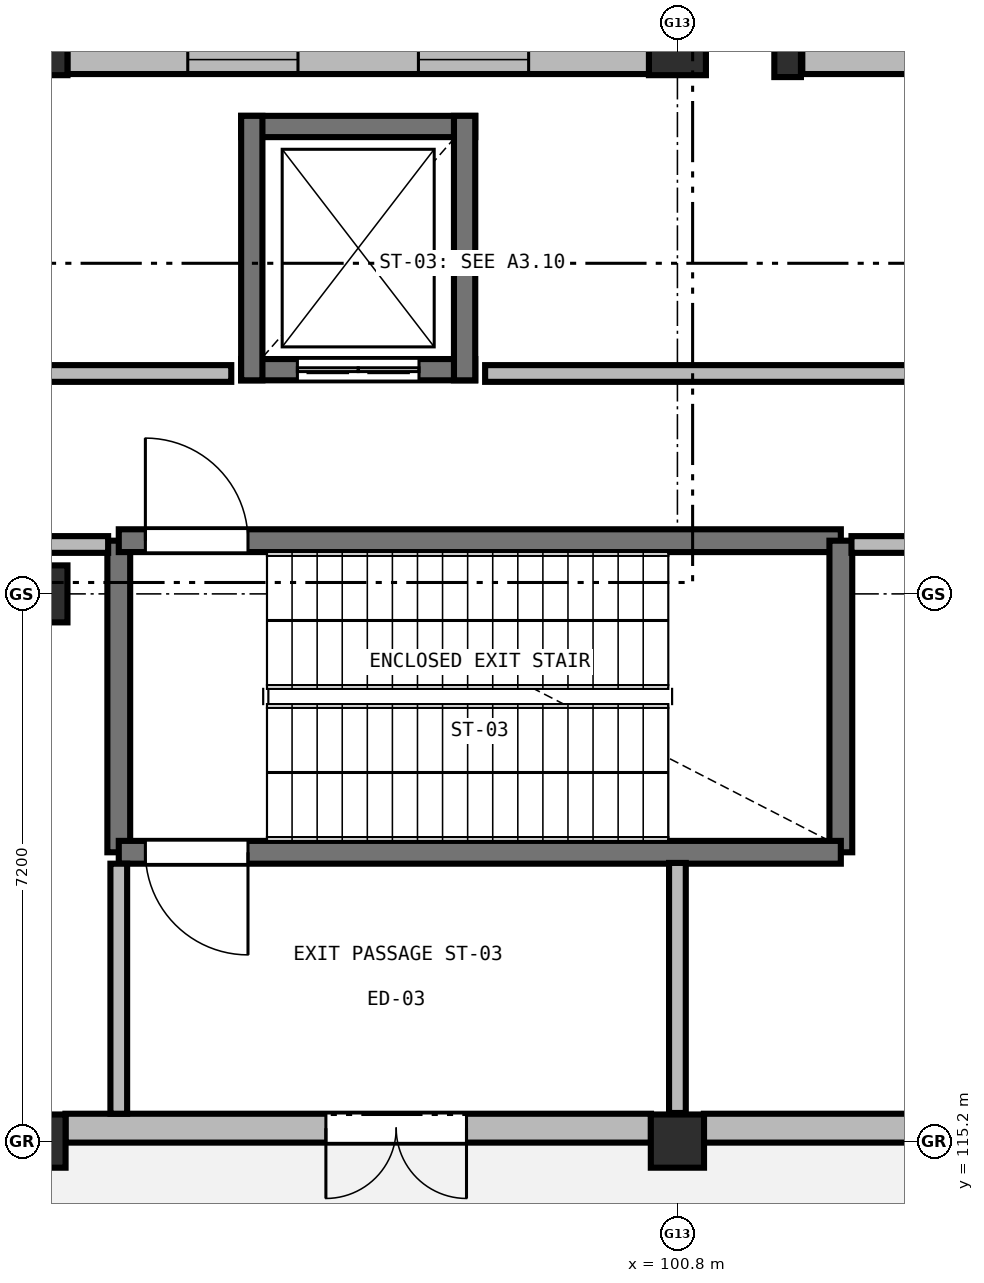
"""IFC4 building model, lengths in metres.
Left out: names, types, materials, properties, quantities, classifications, styles, units other than length and angle.
Written with IfcOpenShell. Run it as: python <this file> out.ifc"""

import sys

from ifc_helpers import new_model, si_unit, direction, frame, frame_2d, origin, origin_2d, place, context, subcontext, project, spatial, rectangle, extrude, element, fill, save


model = new_model("IFC4")
c1 = context("Model", 3, precision=1e-05, world=origin(), true_north=direction((0.0, 1.0)))
c2 = subcontext(c1, "Body", "Model", "MODEL_VIEW")
j1 = project(units=[si_unit("LENGTHUNIT", "METRE"), si_unit("PLANEANGLEUNIT", "RADIAN")], contexts=[c1])
p1 = place(None, origin())
s1 = spatial("IfcSite", under=j1, at=p1, CompositionType="ELEMENT")
p2 = place(p1, origin())
s2 = spatial("IfcBuilding", under=s1, at=p2, CompositionType="ELEMENT")
p3 = place(p2, origin())
s3 = spatial("IfcBuildingStorey", under=s2, at=p3, CompositionType="ELEMENT", Elevation=0.0)
p4 = place(p3, frame((92.4, 115.2, 0.0), z_axis=(0.0, 0.0, 1.0), x_axis=(1.0, 0.0, 0.0)))
e1 = element("IfcColumn", 1, at=p4, inside=s3, PredefinedType="COLUMN", context=c2, shape_type="SweptSolid", body=[
    extrude(rectangle(XDim=0.7, YDim=0.7, at=origin_2d()), origin(), (0.0, 0.0, 1.0), 5.1),
])
for number, where, z_axis, x_axis in (
    (2, (92.4, 122.4, 0.0), (0.0, 0.0, 1.0), (1.0, 0.0, 0.0)),
    (3, (92.4, 129.6, 0.0), (0.0, 0.0, 1.0), (1.0, 0.0, 0.0)),
):
    element("IfcColumn", number, at=place(p3, frame(where, z_axis=z_axis, x_axis=x_axis)), inside=s3, PredefinedType="COLUMN", context=c2, shape_type="SweptSolid", body=[
        extrude(rectangle(XDim=0.75, YDim=0.75, at=origin_2d()), origin(), (0.0, 0.0, 1.0), 5.1),
    ])
p5 = place(p3, frame((100.8, 115.2, 0.0), z_axis=(0.0, 0.0, 1.0), x_axis=(1.0, 0.0, 0.0)))
e4 = element("IfcColumn", 4, at=p5, inside=s3, PredefinedType="COLUMN", context=c2, shape_type="SweptSolid", body=[
    extrude(rectangle(XDim=0.7, YDim=0.7, at=origin_2d()), origin(), (0.0, 0.0, 1.0), 5.1),
])
p6 = place(p3, frame((100.8, 129.6, 0.0), z_axis=(0.0, 0.0, 1.0), x_axis=(1.0, 0.0, 0.0)))
e5 = element("IfcColumn", 5, at=p6, inside=s3, PredefinedType="COLUMN", context=c2, shape_type="SweptSolid", body=[
    extrude(rectangle(XDim=0.75, YDim=0.75, at=origin_2d()), origin(), (0.0, 0.0, 1.0), 5.1),
])
p7 = place(p3, frame((102.25, 129.45, 0.0), z_axis=(0.0, 0.0, 1.0), x_axis=(1.0, 0.0, 0.0)))
e6 = element("IfcColumn", 6, at=p7, inside=s3, PredefinedType="PILASTER", context=c2, shape_type="SweptSolid", body=[
    extrude(rectangle(XDim=0.35, YDim=0.5, at=origin_2d()), origin(), (0.0, 0.0, 1.0), 4.15),
])
p8 = place(p3, frame((92.773, 129.43, 0.0), z_axis=(0.0, 0.0, 1.0), x_axis=(1.0, 0.0, 0.0)))
e7 = element("IfcWall", 7, at=p8, inside=s3, PredefinedType="SOLIDWALL", context=c2, shape_type="SweptSolid", body=[
    extrude(rectangle(XDim=7.654, YDim=0.38, at=frame_2d((3.827, 0.0))), origin(), (0.0, 0.0, 1.0), 4.01),
])
p9 = place(p8, frame((1.585, 0.0, 0.95)))
e8 = element("IfcOpeningElement", 8, at=p9, cuts=e7, PredefinedType="OPENING", context=c2, shape_type="SweptSolid", body=[
    extrude(rectangle(XDim=1.45, YDim=1.85, at=frame_2d((0.725, 0.925))), frame((0.0, 0.2, 0.0), z_axis=(0.0, -1.0, 0.0), x_axis=(1.0, 0.0, 0.0)), (0.0, 0.0, 1.0), 0.4),
])
p10 = place(p8, frame((4.619, 0.0, 0.95)))
e9 = element("IfcOpeningElement", 9, at=p10, cuts=e7, PredefinedType="OPENING", context=c2, shape_type="SweptSolid", body=[
    extrude(rectangle(XDim=1.45, YDim=1.85, at=frame_2d((0.725, 0.925))), frame((0.0, 0.2, 0.0), z_axis=(0.0, -1.0, 0.0), x_axis=(1.0, 0.0, 0.0)), (0.0, 0.0, 1.0), 0.4),
])
p11 = place(p3, frame((102.443, 129.43, 0.0), z_axis=(0.0, 0.0, 1.0), x_axis=(1.0, 0.0, 0.0)))
e10 = element("IfcWall", 10, at=p11, inside=s3, PredefinedType="SOLIDWALL", context=c2, shape_type="SweptSolid", body=[
    extrude(rectangle(XDim=6.409, YDim=0.38, at=frame_2d((3.205, 0.0))), origin(), (0.0, 0.0, 1.0), 4.01),
])
p12 = place(p11, frame((2.004, 0.0, 0.95)))
e11 = element("IfcOpeningElement", 11, at=p12, cuts=e10, PredefinedType="OPENING", context=c2, shape_type="SweptSolid", body=[
    extrude(rectangle(XDim=2.4, YDim=2.1, at=frame_2d((1.2, 1.05))), frame((0.0, 0.2, 0.0), z_axis=(0.0, -1.0, 0.0), x_axis=(1.0, 0.0, 0.0)), (0.0, 0.0, 1.0), 0.4),
])
p13 = place(p3, frame((108.852, 115.37, 0.0), z_axis=(0.0, 0.0, 1.0), x_axis=(-1.0, 0.0, 0.0)))
e12 = element("IfcWall", 12, at=p13, inside=s3, PredefinedType="SOLIDWALL", context=c2, shape_type="SweptSolid", body=[
    extrude(rectangle(XDim=7.704, YDim=0.38, at=frame_2d((3.852, 0.0))), origin(), (0.0, 0.0, 1.0), 4.01),
])
p14 = place(p13, frame((2.852, 0.0, 0.0)))
e13 = element("IfcOpeningElement", 13, at=p14, cuts=e12, PredefinedType="OPENING", context=c2, shape_type="SweptSolid", body=[
    extrude(rectangle(XDim=2.0, YDim=2.4, at=frame_2d((1.0, 1.2))), frame((0.0, 0.2, 0.0), z_axis=(0.0, -1.0, 0.0), x_axis=(1.0, 0.0, 0.0)), (0.0, 0.0, 1.0), 0.4),
])
p15 = place(p3, frame((100.452, 115.37, 0.0), z_axis=(0.0, 0.0, 1.0), x_axis=(-1.0, 0.0, 0.0)))
e14 = element("IfcWall", 14, at=p15, inside=s3, PredefinedType="SOLIDWALL", context=c2, shape_type="SweptSolid", body=[
    extrude(rectangle(XDim=7.704, YDim=0.38, at=frame_2d((3.852, 0.0))), origin(), (0.0, 0.0, 1.0), 4.01),
])
p16 = place(p15, frame((2.427, 0.0, 0.0)))
e15 = element("IfcOpeningElement", 15, at=p16, cuts=e14, PredefinedType="OPENING", context=c2, shape_type="SweptSolid", body=[
    extrude(rectangle(XDim=1.85, YDim=2.3, at=frame_2d((0.925, 1.15))), frame((0.0, 0.2, 0.0), z_axis=(0.0, -1.0, 0.0), x_axis=(1.0, 0.0, 0.0)), (0.0, 0.0, 1.0), 0.4),
])
p17 = place(p3, frame((93.45, 119.0, 0.0), z_axis=(0.0, 0.0, 1.0), x_axis=(0.0, 1.0, 0.0)))
e16 = element("IfcWall", 16, at=p17, inside=s3, PredefinedType="SHEAR", context=c2, shape_type="SweptSolid", body=[
    extrude(rectangle(XDim=4.1, YDim=0.3, at=frame_2d((2.05, 0.0))), origin(), (0.0, 0.0, 1.0), 4.82),
])
p18 = place(p3, frame((93.45, 123.1, 0.0), z_axis=(0.0, 0.0, 1.0), x_axis=(1.0, 0.0, 0.0)))
e17 = element("IfcWall", 17, at=p18, inside=s3, PredefinedType="SHEAR", context=c2, shape_type="SweptSolid", body=[
    extrude(rectangle(XDim=9.5, YDim=0.3, at=frame_2d((4.75, 0.0))), origin(), (0.0, 0.0, 1.0), 4.82),
])
p19 = place(p18, frame((0.35, 0.0, 0.0)))
e18 = element("IfcOpeningElement", 18, at=p19, cuts=e17, PredefinedType="OPENING", context=c2, shape_type="SweptSolid", body=[
    extrude(rectangle(XDim=1.35, YDim=2.2, at=frame_2d((0.675, 1.1))), frame((0.0, 0.16, 0.0), z_axis=(0.0, -1.0, 0.0), x_axis=(1.0, 0.0, 0.0)), (0.0, 0.0, 1.0), 0.32),
])
p20 = place(p3, frame((102.95, 123.1, 0.0), z_axis=(0.0, 0.0, 1.0), x_axis=(0.0, -1.0, 0.0)))
e19 = element("IfcWall", 19, at=p20, inside=s3, PredefinedType="SHEAR", context=c2, shape_type="SweptSolid", body=[
    extrude(rectangle(XDim=4.1, YDim=0.3, at=frame_2d((2.05, 0.0))), origin(), (0.0, 0.0, 1.0), 4.82),
])
p21 = place(p3, frame((102.95, 119.0, 0.0), z_axis=(0.0, 0.0, 1.0), x_axis=(-1.0, 0.0, 0.0)))
e20 = element("IfcWall", 20, at=p21, inside=s3, PredefinedType="SHEAR", context=c2, shape_type="SweptSolid", body=[
    extrude(rectangle(XDim=9.5, YDim=0.3, at=frame_2d((4.75, 0.0))), origin(), (0.0, 0.0, 1.0), 4.82),
])
p22 = place(p21, frame((7.8, 0.0, 0.0)))
e21 = element("IfcOpeningElement", 21, at=p22, cuts=e20, PredefinedType="OPENING", context=c2, shape_type="SweptSolid", body=[
    extrude(rectangle(XDim=1.35, YDim=2.2, at=frame_2d((0.675, 1.1))), frame((0.0, 0.16, 0.0), z_axis=(0.0, -1.0, 0.0), x_axis=(1.0, 0.0, 0.0)), (0.0, 0.0, 1.0), 0.32),
])
p23 = place(p3, frame((98.14, 125.35, 0.0), z_axis=(0.0, 0.0, 1.0), x_axis=(-1.0, 0.0, 0.0)))
e22 = element("IfcWall", 22, at=p23, inside=s3, PredefinedType="SHEAR", context=c2, shape_type="SweptSolid", body=[
    extrude(rectangle(XDim=3.08, YDim=0.28, at=frame_2d((1.54, 0.0))), origin(), (0.0, 0.0, 1.0), 4.82),
])
p24 = place(p23, frame((0.74, 0.0, 0.0)))
e23 = element("IfcOpeningElement", 23, at=p24, cuts=e22, PredefinedType="OPENING", context=c2, shape_type="SweptSolid", body=[
    extrude(rectangle(XDim=1.6, YDim=2.2, at=frame_2d((0.8, 1.1))), frame((0.0, 0.15, 0.0), z_axis=(0.0, -1.0, 0.0), x_axis=(1.0, 0.0, 0.0)), (0.0, 0.0, 1.0), 0.3),
])
p25 = place(p3, frame((95.06, 128.55, 0.0), z_axis=(0.0, 0.0, 1.0), x_axis=(1.0, 0.0, 0.0)))
e24 = element("IfcWall", 24, at=p25, inside=s3, PredefinedType="SHEAR", context=c2, shape_type="SweptSolid", body=[
    extrude(rectangle(XDim=3.08, YDim=0.28, at=frame_2d((1.54, 0.0))), origin(), (0.0, 0.0, 1.0), 4.82),
])
for number, where, z_axis, x_axis in (
    (25, (95.2, 125.21, 0.0), (0.0, 0.0, 1.0), (0.0, 1.0, 0.0)),
    (26, (98.0, 128.69, 0.0), (0.0, 0.0, 1.0), (0.0, -1.0, 0.0)),
):
    element("IfcWall", number, at=place(p3, frame(where, z_axis=z_axis, x_axis=x_axis)), inside=s3, PredefinedType="SHEAR", context=c2, shape_type="SweptSolid", body=[
        extrude(rectangle(XDim=3.48, YDim=0.28, at=frame_2d((1.74, 0.0))), origin(), (0.0, 0.0, 1.0), 4.82),
    ])
p26 = place(p3, frame((75.6, 125.3, 0.0), z_axis=(0.0, 0.0, 1.0), x_axis=(1.0, 0.0, 0.0)))
e27 = element("IfcWall", 27, at=p26, inside=s3, PredefinedType="SOLIDWALL", context=c2, shape_type="SweptSolid", body=[
    extrude(rectangle(XDim=19.33, YDim=0.22, at=frame_2d((9.665, 0.0))), origin(), (0.0, 0.0, 1.0), 4.105),
])
p27 = place(p26, frame((3.375, 0.0, 0.0)))
e28 = element("IfcOpeningElement", 28, at=p27, cuts=e27, PredefinedType="OPENING", context=c2, shape_type="SweptSolid", body=[
    extrude(rectangle(XDim=1.65, YDim=2.2, at=frame_2d((0.825, 1.1))), frame((0.0, 0.12, 0.0), z_axis=(0.0, -1.0, 0.0), x_axis=(1.0, 0.0, 0.0)), (0.0, 0.0, 1.0), 0.24),
])
p28 = place(p3, frame((98.27, 125.3, 0.0), z_axis=(0.0, 0.0, 1.0), x_axis=(1.0, 0.0, 0.0)))
e29 = element("IfcWall", 29, at=p28, inside=s3, PredefinedType="SOLIDWALL", context=c2, shape_type="SweptSolid", body=[
    extrude(rectangle(XDim=10.93, YDim=0.22, at=frame_2d((5.465, 0.0))), origin(), (0.0, 0.0, 1.0), 4.105),
])
p29 = place(p3, frame((93.31, 123.05, 0.0), z_axis=(0.0, 0.0, 1.0), x_axis=(-1.0, 0.0, 0.0)))
e30 = element("IfcWall", 30, at=p29, inside=s3, PredefinedType="SOLIDWALL", context=c2, shape_type="SweptSolid", body=[
    extrude(rectangle(XDim=32.22, YDim=0.22, at=frame_2d((16.11, 0.0))), origin(), (0.0, 0.0, 1.0), 4.105),
])
p30 = place(p29, frame((27.61, 0.0, 0.0)))
e31 = element("IfcOpeningElement", 31, at=p30, cuts=e30, PredefinedType="OPENING", context=c2, shape_type="SweptSolid", body=[
    extrude(rectangle(XDim=1.2, YDim=2.15, at=frame_2d((0.6, 1.075))), frame((0.0, 0.12, 0.0), z_axis=(0.0, -1.0, 0.0), x_axis=(1.0, 0.0, 0.0)), (0.0, 0.0, 1.0), 0.24),
])
p31 = place(p3, frame((100.8, 115.57, 0.0), z_axis=(0.0, 0.0, 1.0), x_axis=(0.0, 1.0, 0.0)))
e32 = element("IfcWall", 32, at=p31, inside=s3, PredefinedType="SOLIDWALL", context=c2, shape_type="SweptSolid", body=[
    extrude(rectangle(XDim=3.29, YDim=0.22, at=frame_2d((1.645, 0.0))), origin(), (0.0, 0.0, 1.0), 4.005),
])
p32 = place(p3, frame((134.18, 123.05, 0.0), z_axis=(0.0, 0.0, 1.0), x_axis=(-1.0, 0.0, 0.0)))
e33 = element("IfcWall", 33, at=p32, inside=s3, PredefinedType="SOLIDWALL", context=c2, shape_type="SweptSolid", body=[
    extrude(rectangle(XDim=31.09, YDim=0.22, at=frame_2d((15.545, 0.0))), origin(), (0.0, 0.0, 1.0), 4.105),
])
p33 = place(p32, frame((28.605, 0.0, 0.0)))
e34 = element("IfcOpeningElement", 34, at=p33, cuts=e33, PredefinedType="OPENING", context=c2, shape_type="SweptSolid", body=[
    extrude(rectangle(XDim=1.15, YDim=2.15, at=frame_2d((0.575, 1.075))), frame((0.0, 0.12, 0.0), z_axis=(0.0, -1.0, 0.0), x_axis=(1.0, 0.0, 0.0)), (0.0, 0.0, 1.0), 0.24),
])
p34 = place(p3, frame((93.45, 115.56, 0.0), z_axis=(0.0, 0.0, 1.0), x_axis=(0.0, 1.0, 0.0)))
e35 = element("IfcWall", 35, at=p34, inside=s3, PredefinedType="SOLIDWALL", context=c2, shape_type="SweptSolid", body=[
    extrude(rectangle(XDim=3.29, YDim=0.22, at=frame_2d((1.645, 0.0))), origin(), (0.0, 0.0, 1.0), 4.005),
])
p35 = place(p9, origin())
e36 = element("IfcWindow", 36, at=p35, inside=s3, PartitioningType="SINGLE_PANEL", PredefinedType="WINDOW", context=c2, shape_type="SweptSolid", body=[
    extrude(rectangle(XDim=1.45, YDim=1.85, at=frame_2d((0.725, 0.925))), frame((0.0, 0.03, 0.0), z_axis=(0.0, -1.0, 0.0), x_axis=(1.0, 0.0, 0.0)), (0.0, 0.0, 1.0), 0.06),
])
fill(e8, e36)
p36 = place(p10, origin())
e37 = element("IfcWindow", 37, at=p36, inside=s3, PartitioningType="SINGLE_PANEL", PredefinedType="WINDOW", context=c2, shape_type="SweptSolid", body=[
    extrude(rectangle(XDim=1.45, YDim=1.85, at=frame_2d((0.725, 0.925))), frame((0.0, 0.03, 0.0), z_axis=(0.0, -1.0, 0.0), x_axis=(1.0, 0.0, 0.0)), (0.0, 0.0, 1.0), 0.06),
])
fill(e9, e37)
p37 = place(p16, origin())
e38 = element("IfcDoor", 38, at=p37, inside=s3, OperationType="DOUBLE_DOOR_SINGLE_SWING", PredefinedType="DOOR", context=c2, shape_type="SweptSolid", body=[
    extrude(rectangle(XDim=1.85, YDim=2.3, at=frame_2d((0.925, 1.15))), frame((0.0, 0.025, 0.0), z_axis=(0.0, -1.0, 0.0), x_axis=(1.0, 0.0, 0.0)), (0.0, 0.0, 1.0), 0.05),
])
fill(e15, e38)
p38 = place(p19, origin())
e39 = element("IfcDoor", 39, at=p38, inside=s3, OperationType="SINGLE_SWING_LEFT", PredefinedType="DOOR", context=c2, shape_type="SweptSolid", body=[
    extrude(rectangle(XDim=1.35, YDim=2.2, at=frame_2d((0.675, 1.1))), frame((0.0, 0.025, 0.0), z_axis=(0.0, -1.0, 0.0), x_axis=(1.0, 0.0, 0.0)), (0.0, 0.0, 1.0), 0.05),
])
fill(e18, e39)
p39 = place(p24, origin())
e40 = element("IfcDoor", 40, at=p39, inside=s3, OperationType="DOUBLE_DOOR_SLIDING", PredefinedType="DOOR", context=c2, shape_type="SweptSolid", body=[
    extrude(rectangle(XDim=1.6, YDim=2.2, at=frame_2d((0.8, 1.1))), frame((0.0, 0.025, 0.0), z_axis=(0.0, -1.0, 0.0), x_axis=(1.0, 0.0, 0.0)), (0.0, 0.0, 1.0), 0.05),
])
fill(e23, e40)
p40 = place(p22, origin())
e41 = element("IfcDoor", 41, at=p40, inside=s3, OperationType="SINGLE_SWING_LEFT", PredefinedType="DOOR", context=c2, shape_type="SweptSolid", body=[
    extrude(rectangle(XDim=1.35, YDim=2.2, at=frame_2d((0.675, 1.1))), frame((0.0, 0.025, 0.0), z_axis=(0.0, -1.0, 0.0), x_axis=(1.0, 0.0, 0.0)), (0.0, 0.0, 1.0), 0.05),
])
fill(e21, e41)
save(model, sys.argv[1])
